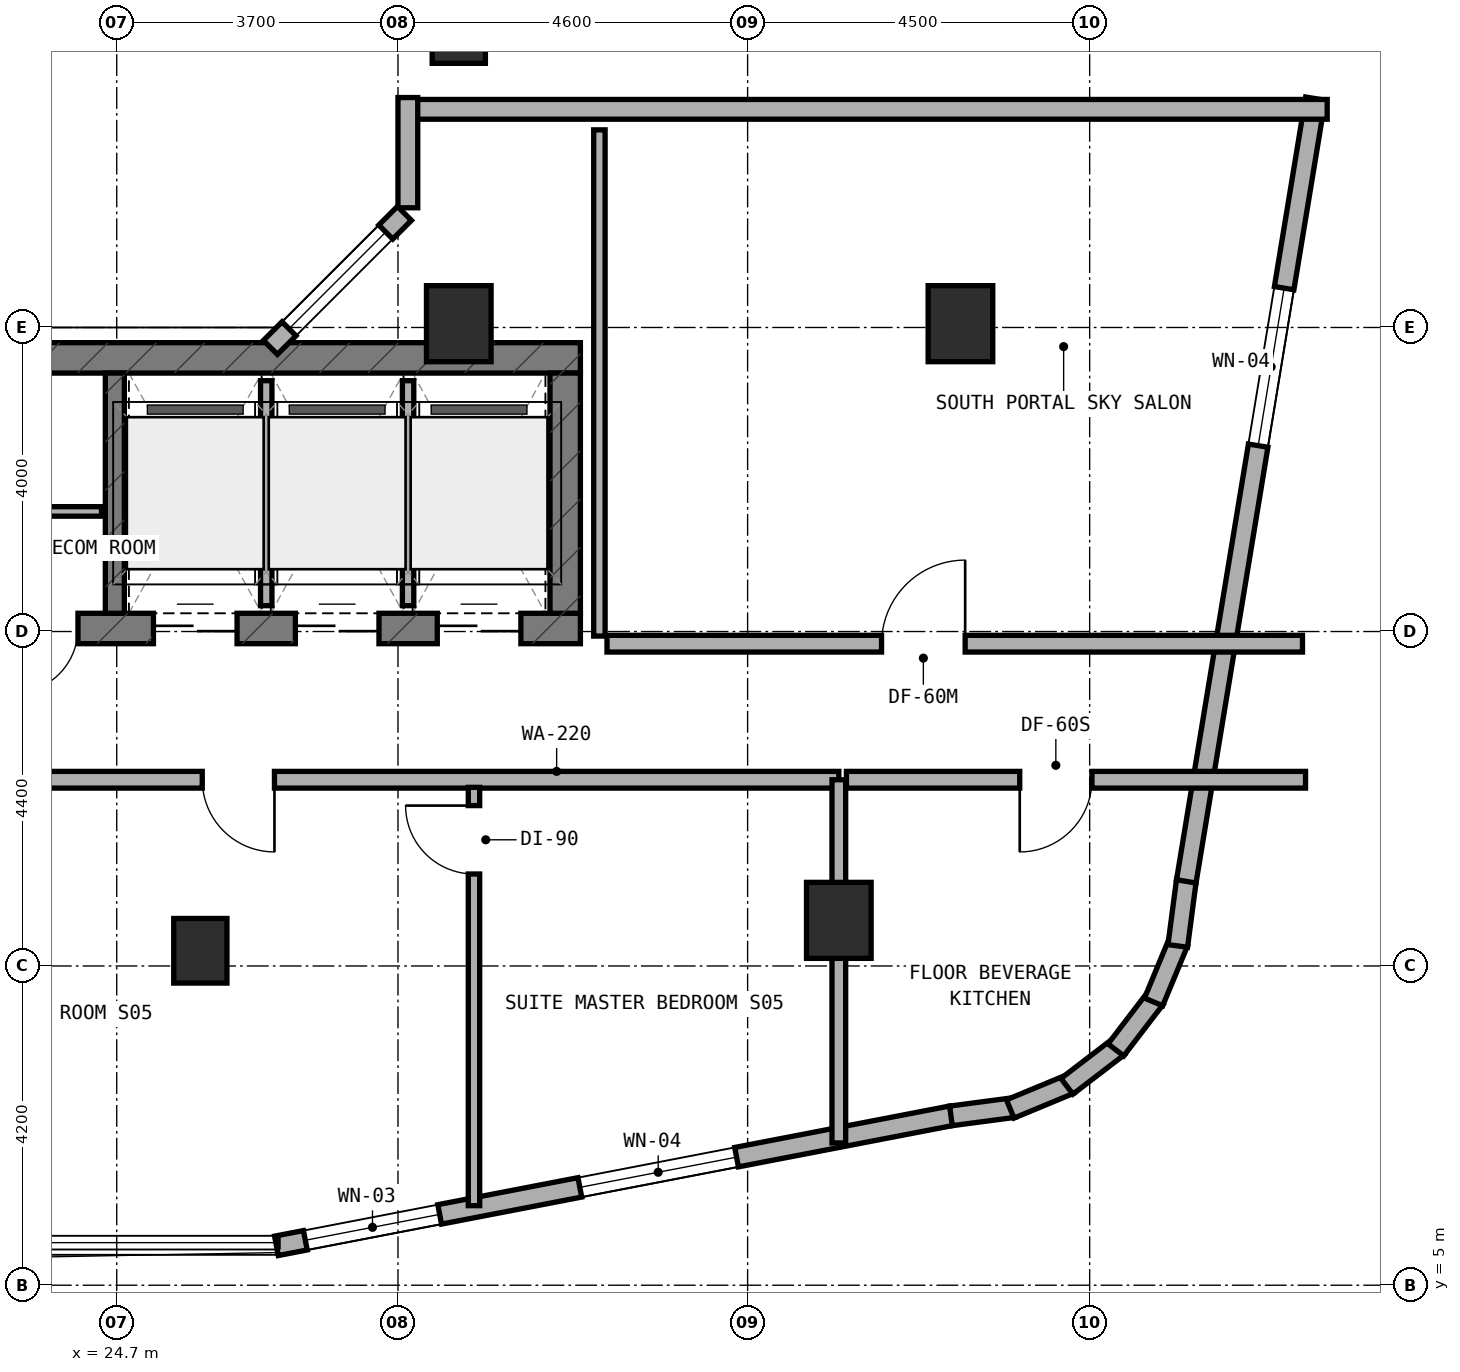
"""IFC4 building model, lengths in metres.
Left out: names, types, materials, properties, quantities, classifications, styles, units other than length and angle.
Written with IfcOpenShell. Run it as: python <this file> out.ifc"""

import sys

from ifc_helpers import new_model, si_unit, direction, frame, frame_2d, origin, origin_2d, place, context, subcontext, project, spatial, rectangle, extrude, element, fill, save


model = new_model("IFC4")
c1 = context("Model", 3, precision=1e-05, world=origin(), true_north=direction((0.0, 1.0)))
c2 = subcontext(c1, "Body", "Model", "MODEL_VIEW")
j1 = project(units=[si_unit("LENGTHUNIT", "METRE"), si_unit("PLANEANGLEUNIT", "RADIAN")], contexts=[c1])
p1 = place(None, origin())
s1 = spatial("IfcSite", under=j1, at=p1, CompositionType="ELEMENT")
p2 = place(p1, origin())
s2 = spatial("IfcBuilding", under=s1, at=p2, CompositionType="ELEMENT")
p3 = place(p2, frame((0.0, 0.0, 195.5)))
s3 = spatial("IfcBuildingStorey", under=s2, at=p3, CompositionType="ELEMENT", Elevation=195.5)
p4 = place(p3, frame((6.4, 13.64, 0.0), z_axis=(0.0, 0.0, 1.0), x_axis=(1.0, 0.0, 0.0)))
e1 = element("IfcWall", 1, at=p4, inside=s3, PredefinedType="SHEAR", context=c2, shape_type="SweptSolid", body=[
    extrude(rectangle(XDim=24.4, YDim=0.4, at=frame_2d((12.2, 0.0))), origin(), (0.0, 0.0, 1.0), 3.6),
])
p5 = place(p4, frame((9.15, 0.0, 0.0)))
e2 = element("IfcOpeningElement", 2, at=p5, cuts=e1, PredefinedType="OPENING", context=c2, shape_type="SweptSolid", body=[
    extrude(rectangle(XDim=1.2, YDim=2.15, at=frame_2d((0.6, 1.075))), frame((0.0, 0.21, 0.0), z_axis=(0.0, -1.0, 0.0), x_axis=(1.0, 0.0, 0.0)), (0.0, 0.0, 1.0), 0.42),
])
p6 = place(p4, frame((16.94, 0.0, 0.0)))
e3 = element("IfcOpeningElement", 3, at=p6, cuts=e1, PredefinedType="OPENING", context=c2, shape_type="SweptSolid", body=[
    extrude(rectangle(XDim=0.85, YDim=2.1, at=frame_2d((0.425, 1.05))), frame((0.0, 0.21, 0.0), z_axis=(0.0, -1.0, 0.0), x_axis=(1.0, 0.0, 0.0)), (0.0, 0.0, 1.0), 0.42),
])
p7 = place(p4, frame((18.783, 0.0, 0.0)))
e4 = element("IfcOpeningElement", 4, at=p7, cuts=e1, PredefinedType="OPENING", context=c2, shape_type="SweptSolid", body=[
    extrude(rectangle(XDim=1.1, YDim=2.15, at=frame_2d((0.55, 1.075))), frame((0.0, 0.21, 0.0), z_axis=(0.0, -1.0, 0.0), x_axis=(1.0, 0.0, 0.0)), (0.0, 0.0, 1.0), 0.42),
])
p8 = place(p4, frame((20.65, 0.0, 0.0)))
e5 = element("IfcOpeningElement", 5, at=p8, cuts=e1, PredefinedType="OPENING", context=c2, shape_type="SweptSolid", body=[
    extrude(rectangle(XDim=1.1, YDim=2.15, at=frame_2d((0.55, 1.075))), frame((0.0, 0.21, 0.0), z_axis=(0.0, -1.0, 0.0), x_axis=(1.0, 0.0, 0.0)), (0.0, 0.0, 1.0), 0.42),
])
p9 = place(p4, frame((22.517, 0.0, 0.0)))
e6 = element("IfcOpeningElement", 6, at=p9, cuts=e1, PredefinedType="OPENING", context=c2, shape_type="SweptSolid", body=[
    extrude(rectangle(XDim=1.1, YDim=2.15, at=frame_2d((0.55, 1.075))), frame((0.0, 0.21, 0.0), z_axis=(0.0, -1.0, 0.0), x_axis=(1.0, 0.0, 0.0)), (0.0, 0.0, 1.0), 0.42),
])
p10 = place(p3, frame((6.4, 17.2, 0.0), z_axis=(0.0, 0.0, 1.0), x_axis=(1.0, 0.0, 0.0)))
e7 = element("IfcWall", 7, at=p10, inside=s3, PredefinedType="SHEAR", context=c2, shape_type="SweptSolid", body=[
    extrude(rectangle(XDim=24.4, YDim=0.4, at=frame_2d((12.2, 0.0))), origin(), (0.0, 0.0, 1.0), 3.6),
])
p11 = place(p3, frame((30.6, 13.84, 0.0), z_axis=(0.0, 0.0, 1.0), x_axis=(0.0, 1.0, 0.0)))
e8 = element("IfcWall", 8, at=p11, inside=s3, PredefinedType="SHEAR", context=c2, shape_type="SweptSolid", body=[
    extrude(rectangle(XDim=3.16, YDim=0.4, at=frame_2d((1.58, 0.0))), origin(), (0.0, 0.0, 1.0), 3.6),
])
p12 = place(p3, frame((24.675, 13.84, 0.0), z_axis=(0.0, 0.0, 1.0), x_axis=(0.0, 1.0, 0.0)))
e9 = element("IfcWall", 9, at=p12, inside=s3, PredefinedType="STANDARD", context=c2, shape_type="SweptSolid", body=[
    extrude(rectangle(XDim=3.16, YDim=0.25, at=frame_2d((1.58, 0.0))), origin(), (0.0, 0.0, 1.0), 3.28),
])
p13 = place(p3, frame((25.8, 9.4, 0.0), z_axis=(0.0, 0.0, 1.0), x_axis=(1.0, 0.0, 0.0)))
e10 = element("IfcColumn", 10, at=p13, inside=s3, PredefinedType="COLUMN", context=c2, shape_type="SweptSolid", body=[
    extrude(rectangle(XDim=0.7, YDim=0.85, at=origin_2d()), origin(), (0.0, 0.0, 1.0), 3.6),
])
for number, where, z_axis, x_axis in (
    (11, (34.2, 9.8, 0.0), (0.0, 0.0, 1.0), (1.0, 0.0, 0.0)),
    (12, (35.8, 17.65, 0.0), (0.0, 0.0, 1.0), (1.0, 0.0, 0.0)),
    (13, (29.2, 17.65, 0.0), (0.0, 0.0, 1.0), (1.0, 0.0, 0.0)),
):
    element("IfcColumn", number, at=place(p3, frame(where, z_axis=z_axis, x_axis=x_axis)), inside=s3, PredefinedType="COLUMN", context=c2, shape_type="SweptSolid", body=[
        extrude(rectangle(XDim=0.85, YDim=1.0, at=origin_2d()), origin(), (0.0, 0.0, 1.0), 3.6),
    ])
p14 = place(p3, frame((29.2, 21.5, 0.0), z_axis=(0.0, 0.0, 1.0), x_axis=(1.0, 0.0, 0.0)))
e14 = element("IfcColumn", 14, at=p14, inside=s3, PredefinedType="COLUMN", context=c2, shape_type="SweptSolid", body=[
    extrude(rectangle(XDim=0.7, YDim=0.85, at=origin_2d()), origin(), (0.0, 0.0, 1.0), 3.6),
])
p15 = place(p3, frame((26.801, 5.518, 0.0), z_axis=(0.0, 0.0, 1.0), x_axis=(0.98192801022, 0.189254809039, 0.0)))
e15 = element("IfcWall", 15, at=p15, inside=s3, PredefinedType="STANDARD", context=c2, shape_type="SweptSolid", body=[
    extrude(rectangle(XDim=9.046, YDim=0.26, at=frame_2d((4.523, 0.0))), origin(), (0.0, 0.0, 1.0), 3.28),
])
p16 = place(p15, frame((0.387, 0.0, 0.85)))
e16 = element("IfcOpeningElement", 16, at=p16, cuts=e15, PredefinedType="OPENING", context=c2, shape_type="SweptSolid", body=[
    extrude(rectangle(XDim=1.8, YDim=1.5, at=frame_2d((0.9, 0.75))), frame((0.0, 0.14, 0.0), z_axis=(0.0, -1.0, 0.0), x_axis=(1.0, 0.0, 0.0)), (0.0, 0.0, 1.0), 0.28),
])
p17 = place(p15, frame((4.065, 0.0, 0.85)))
e17 = element("IfcOpeningElement", 17, at=p17, cuts=e15, PredefinedType="OPENING", context=c2, shape_type="SweptSolid", body=[
    extrude(rectangle(XDim=2.1, YDim=1.5, at=frame_2d((1.05, 0.75))), frame((0.0, 0.14, 0.0), z_axis=(0.0, -1.0, 0.0), x_axis=(1.0, 0.0, 0.0)), (0.0, 0.0, 1.0), 0.28),
])
p18 = place(p3, frame((35.675, 7.228, 0.0), z_axis=(0.0, 0.0, 1.0), x_axis=(0.99142134712, 0.130704676564, 0.0)))
e18 = element("IfcWall", 18, at=p18, inside=s3, PredefinedType="STANDARD", context=c2, shape_type="SweptSolid", body=[
    extrude(rectangle(XDim=0.833, YDim=0.26, at=frame_2d((0.417, 0.0))), origin(), (0.0, 0.0, 1.0), 3.28),
])
p19 = place(p3, frame((36.455, 7.319, 0.0), z_axis=(0.0, 0.0, 1.0), x_axis=(0.923712395518, 0.383086687796, 0.0)))
e19 = element("IfcWall", 19, at=p19, inside=s3, PredefinedType="STANDARD", context=c2, shape_type="SweptSolid", body=[
    extrude(rectangle(XDim=0.851, YDim=0.26, at=frame_2d((0.425, 0.0))), origin(), (0.0, 0.0, 1.0), 3.28),
])
for number, where, z_axis, x_axis in (
    (20, (37.201, 7.617, 0.0), (0.0, 0.0, 1.0), (0.794, 0.608, 0.0)),
    (21, (37.845, 8.096, 0.0), (0.0, 0.0, 1.0), (0.608, 0.794, 0.0)),
):
    element("IfcWall", number, at=place(p3, frame(where, z_axis=z_axis, x_axis=x_axis)), inside=s3, PredefinedType="STANDARD", context=c2, shape_type="SweptSolid", body=[
        extrude(rectangle(XDim=0.85, YDim=0.26, at=frame_2d((0.425, 0.0))), origin(), (0.0, 0.0, 1.0), 3.28),
    ])
p20 = place(p3, frame((38.341, 8.727, 0.0), z_axis=(0.0, 0.0, 1.0), x_axis=(0.383086687796, 0.923712395518, 0.0)))
e22 = element("IfcWall", 22, at=p20, inside=s3, PredefinedType="STANDARD", context=c2, shape_type="SweptSolid", body=[
    extrude(rectangle(XDim=0.851, YDim=0.26, at=frame_2d((0.425, 0.0))), origin(), (0.0, 0.0, 1.0), 3.28),
])
p21 = place(p3, frame((38.659, 9.464, 0.0), z_axis=(0.0, 0.0, 1.0), x_axis=(0.130192647656, 0.991488716273, 0.0)))
e23 = element("IfcWall", 23, at=p21, inside=s3, PredefinedType="STANDARD", context=c2, shape_type="SweptSolid", body=[
    extrude(rectangle(XDim=0.868, YDim=0.26, at=frame_2d((0.434, 0.0))), origin(), (0.0, 0.0, 1.0), 3.28),
])
p22 = place(p3, frame((38.771, 10.313, 0.0), z_axis=(0.0, 0.0, 1.0), x_axis=(0.16277908586, 0.986662540693, 0.0)))
e24 = element("IfcWall", 24, at=p22, inside=s3, PredefinedType="STANDARD", context=c2, shape_type="SweptSolid", body=[
    extrude(rectangle(XDim=10.437, YDim=0.26, at=frame_2d((5.219, 0.0))), origin(), (0.0, 0.0, 1.0), 3.28),
])
p23 = place(p22, frame((5.81, 0.0, 0.85)))
e25 = element("IfcOpeningElement", 25, at=p23, cuts=e24, PredefinedType="OPENING", context=c2, shape_type="SweptSolid", body=[
    extrude(rectangle(XDim=2.1, YDim=1.5, at=frame_2d((1.05, 0.75))), frame((0.0, 0.14, 0.0), z_axis=(0.0, -1.0, 0.0), x_axis=(1.0, 0.0, 0.0)), (0.0, 0.0, 1.0), 0.28),
])
p24 = place(p3, frame((40.625, 20.47, 0.0), z_axis=(0.0, 0.0, 1.0), x_axis=(-1.0, 0.0, 0.0)))
e26 = element("IfcWall", 26, at=p24, inside=s3, PredefinedType="STANDARD", context=c2, shape_type="SweptSolid", body=[
    extrude(rectangle(XDim=12.215, YDim=0.26, at=frame_2d((6.107, 0.0))), origin(), (0.0, 0.0, 1.0), 2.25),
])
p25 = place(p3, frame((28.53, 20.625, 0.0), z_axis=(0.0, 0.0, 1.0), x_axis=(0.0, -1.0, 0.0)))
e27 = element("IfcWall", 27, at=p25, inside=s3, PredefinedType="STANDARD", context=c2, shape_type="SweptSolid", body=[
    extrude(rectangle(XDim=1.45, YDim=0.26, at=frame_2d((0.725, 0.0))), origin(), (0.0, 0.0, 1.0), 3.28),
])
p26 = place(p3, frame((28.485, 19.101, 0.0), z_axis=(0.0, 0.0, 1.0), x_axis=(-0.707106781187, -0.707106781187, 0.0)))
e28 = element("IfcWall", 28, at=p26, inside=s3, PredefinedType="STANDARD", context=c2, shape_type="SweptSolid", body=[
    extrude(rectangle(XDim=2.493, YDim=0.26, at=frame_2d((1.247, 0.0))), origin(), (0.0, 0.0, 1.0), 3.28),
])
p27 = place(p26, frame((0.347, 0.0, 0.85)))
e29 = element("IfcOpeningElement", 29, at=p27, cuts=e28, PredefinedType="OPENING", context=c2, shape_type="SweptSolid", body=[
    extrude(rectangle(XDim=1.8, YDim=1.5, at=frame_2d((0.9, 0.75))), frame((0.0, 0.14, 0.0), z_axis=(0.0, -1.0, 0.0), x_axis=(1.0, 0.0, 0.0)), (0.0, 0.0, 1.0), 0.28),
])
p28 = place(p3, frame((23.15, 15.18, 0.0), z_axis=(0.0, 0.0, 1.0), x_axis=(1.0, 0.0, 0.0)))
e30 = element("IfcWall", 30, at=p28, inside=s3, PredefinedType="PARTITIONING", context=c2, shape_type="SweptSolid", body=[
    extrude(rectangle(XDim=1.35, YDim=0.125, at=frame_2d((0.675, 0.0))), origin(), (0.0, 0.0, 1.0), 3.28),
])
p29 = place(p3, frame((26.667, 13.94, 0.0), z_axis=(0.0, 0.0, 1.0), x_axis=(0.0, 1.0, 0.0)))
e31 = element("IfcWall", 31, at=p29, inside=s3, PredefinedType="PARTITIONING", context=c2, shape_type="SweptSolid", body=[
    extrude(rectangle(XDim=2.96, YDim=0.15, at=frame_2d((1.48, 0.0))), origin(), (0.0, 0.0, 1.0), 3.28),
])
p30 = place(p3, frame((28.533, 13.94, 0.0), z_axis=(0.0, 0.0, 1.0), x_axis=(0.0, 1.0, 0.0)))
e32 = element("IfcWall", 32, at=p30, inside=s3, PredefinedType="PARTITIONING", context=c2, shape_type="SweptSolid", body=[
    extrude(rectangle(XDim=2.96, YDim=0.15, at=frame_2d((1.48, 0.0))), origin(), (0.0, 0.0, 1.0), 2.955),
])
p31 = place(p3, frame((18.4, 11.65, 0.0), z_axis=(0.0, 0.0, 1.0), x_axis=(1.0, 0.0, 0.0)))
e33 = element("IfcWall", 33, at=p31, inside=s3, PredefinedType="SOLIDWALL", context=c2, shape_type="SweptSolid", body=[
    extrude(rectangle(XDim=15.8, YDim=0.22, at=frame_2d((7.9, 0.0))), origin(), (0.0, 0.0, 1.0), 2.955),
])
p32 = place(p31, frame((7.425, 0.0, 0.0)))
e34 = element("IfcOpeningElement", 34, at=p32, cuts=e33, PredefinedType="OPENING", context=c2, shape_type="SweptSolid", body=[
    extrude(rectangle(XDim=0.95, YDim=2.1, at=frame_2d((0.475, 1.05))), frame((0.0, 0.12, 0.0), z_axis=(0.0, -1.0, 0.0), x_axis=(1.0, 0.0, 0.0)), (0.0, 0.0, 1.0), 0.24),
])
p33 = place(p3, frame((29.4, 6.047, 0.0), z_axis=(0.0, 0.0, 1.0), x_axis=(0.0, 1.0, 0.0)))
e35 = element("IfcWall", 35, at=p33, inside=s3, PredefinedType="PARTITIONING", context=c2, shape_type="SweptSolid", body=[
    extrude(rectangle(XDim=5.503, YDim=0.15, at=frame_2d((2.751, 0.0))), origin(), (0.0, 0.0, 1.0), 2.895),
])
p34 = place(p33, frame((4.363, 0.0, 0.0)))
e36 = element("IfcOpeningElement", 36, at=p34, cuts=e35, PredefinedType="OPENING", context=c2, shape_type="SweptSolid", body=[
    extrude(rectangle(XDim=0.9, YDim=2.1, at=frame_2d((0.45, 1.05))), frame((0.0, 0.085, 0.0), z_axis=(0.0, -1.0, 0.0), x_axis=(1.0, 0.0, 0.0)), (0.0, 0.0, 1.0), 0.17),
])
p35 = place(p3, frame((34.2, 6.872, 0.0), z_axis=(0.0, 0.0, 1.0), x_axis=(0.0, 1.0, 0.0)))
e37 = element("IfcWall", 37, at=p35, inside=s3, PredefinedType="SOLIDWALL", context=c2, shape_type="SweptSolid", body=[
    extrude(rectangle(XDim=4.778, YDim=0.18, at=frame_2d((2.389, 0.0))), origin(), (0.0, 0.0, 1.0), 2.895),
])
p36 = place(p3, frame((34.3, 11.65, 0.0), z_axis=(0.0, 0.0, 1.0), x_axis=(1.0, 0.0, 0.0)))
e38 = element("IfcWall", 38, at=p36, inside=s3, PredefinedType="SOLIDWALL", context=c2, shape_type="SweptSolid", body=[
    extrude(rectangle(XDim=6.04, YDim=0.22, at=frame_2d((3.02, 0.0))), origin(), (0.0, 0.0, 1.0), 2.895),
])
p37 = place(p36, frame((2.28, 0.0, 0.0)))
e39 = element("IfcOpeningElement", 39, at=p37, cuts=e38, PredefinedType="OPENING", context=c2, shape_type="SweptSolid", body=[
    extrude(rectangle(XDim=0.95, YDim=2.1, at=frame_2d((0.475, 1.05))), frame((0.0, 0.12, 0.0), z_axis=(0.0, -1.0, 0.0), x_axis=(1.0, 0.0, 0.0)), (0.0, 0.0, 1.0), 0.24),
])
p38 = place(p3, frame((31.05, 13.54, 0.0), z_axis=(0.0, 0.0, 1.0), x_axis=(0.0, 1.0, 0.0)))
e40 = element("IfcWall", 40, at=p38, inside=s3, PredefinedType="PARTITIONING", context=c2, shape_type="SweptSolid", body=[
    extrude(rectangle(XDim=6.66, YDim=0.15, at=frame_2d((3.33, 0.0))), origin(), (0.0, 0.0, 1.0), 2.955),
])
p39 = place(p3, frame((31.15, 13.44, 0.0), z_axis=(0.0, 0.0, 1.0), x_axis=(1.0, 0.0, 0.0)))
e41 = element("IfcWall", 41, at=p39, inside=s3, PredefinedType="SOLIDWALL", context=c2, shape_type="SweptSolid", body=[
    extrude(rectangle(XDim=9.15, YDim=0.22, at=frame_2d((4.575, 0.0))), origin(), (0.0, 0.0, 1.0), 2.895),
])
p40 = place(p39, frame((3.612, 0.0, 0.0)))
e42 = element("IfcOpeningElement", 42, at=p40, cuts=e41, PredefinedType="OPENING", context=c2, shape_type="SweptSolid", body=[
    extrude(rectangle(XDim=1.1, YDim=2.1, at=frame_2d((0.55, 1.05))), frame((0.0, 0.12, 0.0), z_axis=(0.0, -1.0, 0.0), x_axis=(1.0, 0.0, 0.0)), (0.0, 0.0, 1.0), 0.24),
])
p41 = place(p16, origin())
e43 = element("IfcWindow", 43, at=p41, inside=s3, PartitioningType="SINGLE_PANEL", PredefinedType="WINDOW", context=c2, shape_type="SweptSolid", body=[
    extrude(rectangle(XDim=1.8, YDim=1.5, at=frame_2d((0.9, 0.75))), frame((0.0, 0.03, 0.0), z_axis=(0.0, -1.0, 0.0), x_axis=(1.0, 0.0, 0.0)), (0.0, 0.0, 1.0), 0.06),
])
fill(e16, e43)
p42 = place(p17, origin())
e44 = element("IfcWindow", 44, at=p42, inside=s3, PartitioningType="SINGLE_PANEL", PredefinedType="WINDOW", context=c2, shape_type="SweptSolid", body=[
    extrude(rectangle(XDim=2.1, YDim=1.5, at=frame_2d((1.05, 0.75))), frame((0.0, 0.03, 0.0), z_axis=(0.0, -1.0, 0.0), x_axis=(1.0, 0.0, 0.0)), (0.0, 0.0, 1.0), 0.06),
])
fill(e17, e44)
p43 = place(p23, origin())
e45 = element("IfcWindow", 45, at=p43, inside=s3, PartitioningType="SINGLE_PANEL", PredefinedType="WINDOW", context=c2, shape_type="SweptSolid", body=[
    extrude(rectangle(XDim=2.1, YDim=1.5, at=frame_2d((1.05, 0.75))), frame((0.0, 0.03, 0.0), z_axis=(0.0, -1.0, 0.0), x_axis=(1.0, 0.0, 0.0)), (0.0, 0.0, 1.0), 0.06),
])
fill(e25, e45)
p44 = place(p27, origin())
e46 = element("IfcWindow", 46, at=p44, inside=s3, PartitioningType="SINGLE_PANEL", PredefinedType="WINDOW", context=c2, shape_type="SweptSolid", body=[
    extrude(rectangle(XDim=1.8, YDim=1.5, at=frame_2d((0.9, 0.75))), frame((0.0, 0.03, 0.0), z_axis=(0.0, -1.0, 0.0), x_axis=(1.0, 0.0, 0.0)), (0.0, 0.0, 1.0), 0.06),
])
fill(e29, e46)
p45 = place(p6, frame((0.85, 0.0, 0.0), z_axis=(0.0, 0.0, 1.0), x_axis=(-1.0, 0.0, 0.0)))
e47 = element("IfcDoor", 47, at=p45, inside=s3, OperationType="SINGLE_SWING_RIGHT", PredefinedType="DOOR", context=c2, shape_type="SweptSolid", body=[
    extrude(rectangle(XDim=0.85, YDim=2.1, at=frame_2d((0.425, 1.05))), frame((0.0, 0.025, 0.0), z_axis=(0.0, -1.0, 0.0), x_axis=(1.0, 0.0, 0.0)), (0.0, 0.0, 1.0), 0.05),
])
fill(e3, e47)
p46 = place(p7, frame((1.1, 0.0, 0.0), z_axis=(0.0, 0.0, 1.0), x_axis=(-1.0, 0.0, 0.0)))
e48 = element("IfcDoor", 48, at=p46, inside=s3, OperationType="DOUBLE_DOOR_SLIDING", PredefinedType="DOOR", context=c2, shape_type="SweptSolid", body=[
    extrude(rectangle(XDim=1.1, YDim=2.15, at=frame_2d((0.55, 1.075))), frame((0.0, 0.025, 0.0), z_axis=(0.0, -1.0, 0.0), x_axis=(1.0, 0.0, 0.0)), (0.0, 0.0, 1.0), 0.05),
])
fill(e4, e48)
p47 = place(p8, frame((1.1, 0.0, 0.0), z_axis=(0.0, 0.0, 1.0), x_axis=(-1.0, 0.0, 0.0)))
e49 = element("IfcDoor", 49, at=p47, inside=s3, OperationType="DOUBLE_DOOR_SLIDING", PredefinedType="DOOR", context=c2, shape_type="SweptSolid", body=[
    extrude(rectangle(XDim=1.1, YDim=2.15, at=frame_2d((0.55, 1.075))), frame((0.0, 0.025, 0.0), z_axis=(0.0, -1.0, 0.0), x_axis=(1.0, 0.0, 0.0)), (0.0, 0.0, 1.0), 0.05),
])
fill(e5, e49)
p48 = place(p9, frame((1.1, 0.0, 0.0), z_axis=(0.0, 0.0, 1.0), x_axis=(-1.0, 0.0, 0.0)))
e50 = element("IfcDoor", 50, at=p48, inside=s3, OperationType="DOUBLE_DOOR_SLIDING", PredefinedType="DOOR", context=c2, shape_type="SweptSolid", body=[
    extrude(rectangle(XDim=1.1, YDim=2.15, at=frame_2d((0.55, 1.075))), frame((0.0, 0.025, 0.0), z_axis=(0.0, -1.0, 0.0), x_axis=(1.0, 0.0, 0.0)), (0.0, 0.0, 1.0), 0.05),
])
fill(e6, e50)
p49 = place(p32, frame((0.95, 0.0, 0.0), z_axis=(0.0, 0.0, 1.0), x_axis=(-1.0, 0.0, 0.0)))
e51 = element("IfcDoor", 51, at=p49, inside=s3, OperationType="SINGLE_SWING_LEFT", PredefinedType="DOOR", context=c2, shape_type="SweptSolid", body=[
    extrude(rectangle(XDim=0.95, YDim=2.1, at=frame_2d((0.475, 1.05))), frame((0.0, 0.025, 0.0), z_axis=(0.0, -1.0, 0.0), x_axis=(1.0, 0.0, 0.0)), (0.0, 0.0, 1.0), 0.05),
])
fill(e34, e51)
p50 = place(p34, origin())
e52 = element("IfcDoor", 52, at=p50, inside=s3, OperationType="SINGLE_SWING_RIGHT", PredefinedType="DOOR", context=c2, shape_type="SweptSolid", body=[
    extrude(rectangle(XDim=0.9, YDim=2.1, at=frame_2d((0.45, 1.05))), frame((0.0, 0.025, 0.0), z_axis=(0.0, -1.0, 0.0), x_axis=(1.0, 0.0, 0.0)), (0.0, 0.0, 1.0), 0.05),
])
fill(e36, e52)
p51 = place(p37, frame((0.95, 0.0, 0.0), z_axis=(0.0, 0.0, 1.0), x_axis=(-1.0, 0.0, 0.0)))
e53 = element("IfcDoor", 53, at=p51, inside=s3, OperationType="SINGLE_SWING_RIGHT", PredefinedType="DOOR", context=c2, shape_type="SweptSolid", body=[
    extrude(rectangle(XDim=0.95, YDim=2.1, at=frame_2d((0.475, 1.05))), frame((0.0, 0.025, 0.0), z_axis=(0.0, -1.0, 0.0), x_axis=(1.0, 0.0, 0.0)), (0.0, 0.0, 1.0), 0.05),
])
fill(e39, e53)
p52 = place(p40, origin())
e54 = element("IfcDoor", 54, at=p52, inside=s3, OperationType="SINGLE_SWING_RIGHT", PredefinedType="DOOR", context=c2, shape_type="SweptSolid", body=[
    extrude(rectangle(XDim=1.1, YDim=2.1, at=frame_2d((0.55, 1.05))), frame((0.0, 0.025, 0.0), z_axis=(0.0, -1.0, 0.0), x_axis=(1.0, 0.0, 0.0)), (0.0, 0.0, 1.0), 0.05),
])
fill(e42, e54)
save(model, sys.argv[1])
